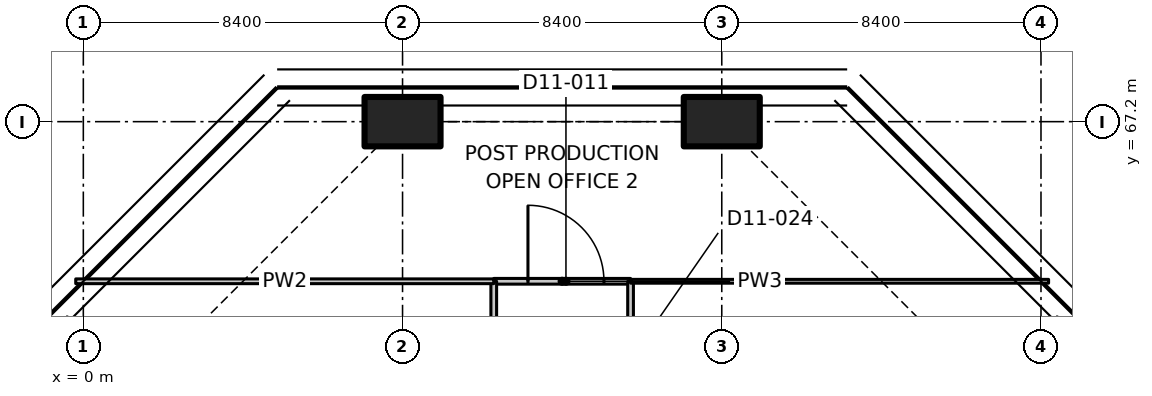
"""IFC4 building model, lengths in metres.
Left out: names, types, materials, properties, quantities, classifications, styles, units other than length and angle.
Written with IfcOpenShell. Run it as: python <this file> out.ifc"""

import sys

from ifc_helpers import new_model, si_unit, direction, frame, frame_2d, origin, origin_2d, place, context, subcontext, project, spatial, polyline, rectangle, outline, extrude, element, fill, save


model = new_model("IFC4")
c1 = context("Model", 3, precision=1e-05, world=origin(), true_north=direction((0.0, 1.0)))
c2 = subcontext(c1, "Body", "Model", "MODEL_VIEW")
j1 = project(units=[si_unit("LENGTHUNIT", "METRE"), si_unit("PLANEANGLEUNIT", "RADIAN")], contexts=[c1])
p1 = place(None, origin())
s1 = spatial("IfcSite", under=j1, at=p1, CompositionType="ELEMENT")
p2 = place(p1, origin())
s2 = spatial("IfcBuilding", under=s1, at=p2, CompositionType="ELEMENT")
p3 = place(p2, frame((0.0, 0.0, 79.7)))
s3 = spatial("IfcBuildingStorey", under=s2, at=p3, CompositionType="ELEMENT", Elevation=79.7)
for number, where, z_axis, x_axis in (
    (1, (8.4, 67.2, 0.0), (0.0, 0.0, 1.0), (0.0, 1.0, 0.0)),
    (2, (16.8, 67.2, 0.0), (0.0, 0.0, 1.0), (0.0, 1.0, 0.0)),
):
    element("IfcColumn", number, at=place(p3, frame(where, z_axis=z_axis, x_axis=x_axis)), inside=s3, PredefinedType="COLUMN", context=c2, shape_type="SweptSolid", body=[
        extrude(rectangle(XDim=1.3, YDim=2.0, at=origin_2d()), origin(), (0.0, 0.0, 1.0), 3.35),
    ])
p4 = place(p3, frame((10.8, 63.0, 0.0), z_axis=(0.0, 0.0, 1.0), x_axis=(1.0, 0.0, 0.0)))
e3 = element("IfcWall", 3, at=p4, inside=s3, PredefinedType="PARTITIONING", context=c2, shape_type="SweptSolid", body=[
    extrude(rectangle(XDim=3.6, YDim=0.15, at=frame_2d((1.8, 0.0))), origin(), (0.0, 0.0, 1.0), 3.33),
])
p5 = place(p4, frame((0.9, 0.0, 0.0)))
e4 = element("IfcOpeningElement", 4, at=p5, cuts=e3, PredefinedType="OPENING", context=c2, shape_type="SweptSolid", body=[
    extrude(rectangle(XDim=2.0, YDim=2.4, at=frame_2d((1.0, 1.2))), frame((0.0, 0.085, 0.0), z_axis=(0.0, -1.0, 0.0), x_axis=(1.0, 0.0, 0.0)), (0.0, 0.0, 1.0), 0.17),
])
p6 = place(p3, frame((10.8, 54.6, 0.0), z_axis=(0.0, 0.0, 1.0), x_axis=(0.0, 1.0, 0.0)))
e5 = element("IfcWall", 5, at=p6, inside=s3, PredefinedType="PARTITIONING", context=c2, shape_type="SweptSolid", body=[
    extrude(rectangle(XDim=8.4, YDim=0.15, at=frame_2d((4.2, 0.0))), origin(), (0.0, 0.0, 1.0), 3.33),
])
p7 = place(p6, frame((3.3, 0.0, 0.0)))
e6 = element("IfcOpeningElement", 6, at=p7, cuts=e5, PredefinedType="OPENING", context=c2, shape_type="SweptSolid", body=[
    extrude(rectangle(XDim=1.6, YDim=2.1, at=frame_2d((0.8, 1.05))), frame((0.0, 0.085, 0.0), z_axis=(0.0, -1.0, 0.0), x_axis=(1.0, 0.0, 0.0)), (0.0, 0.0, 1.0), 0.17),
])
p8 = place(p3, frame((14.4, 63.0, 0.0), z_axis=(0.0, 0.0, 1.0), x_axis=(0.0, -1.0, 0.0)))
e7 = element("IfcWall", 7, at=p8, inside=s3, PredefinedType="PARTITIONING", context=c2, shape_type="SweptSolid", body=[
    extrude(rectangle(XDim=4.2, YDim=0.15, at=frame_2d((2.1, 0.0))), origin(), (0.0, 0.0, 1.0), 3.33),
])
p9 = place(p8, frame((1.5, 0.0, 0.0)))
e8 = element("IfcOpeningElement", 8, at=p9, cuts=e7, PredefinedType="OPENING", context=c2, shape_type="SweptSolid", body=[
    extrude(rectangle(XDim=1.1, YDim=2.1, at=frame_2d((0.55, 1.05))), frame((0.0, 0.085, 0.0), z_axis=(0.0, -1.0, 0.0), x_axis=(1.0, 0.0, 0.0)), (0.0, 0.0, 1.0), 0.17),
])
p10 = place(p3, frame((10.8, 63.0, 0.0), z_axis=(0.0, 0.0, 1.0), x_axis=(-1.0, 0.0, 0.0)))
e9 = element("IfcWall", 9, at=p10, inside=s3, PredefinedType="PARTITIONING", context=c2, shape_type="SweptSolid", body=[
    extrude(outline(polyline([(0.0, 0.0), (11.0, 0.0), (11.0, 3.33), (7.278, 3.33), (7.276, 2.98), (5.924, 2.98), (5.922, 3.33), (0.0, 3.33), (0.0, 0.0)])), frame((0.0, 0.062, 0.0), z_axis=(0.0, -1.0, 0.0), x_axis=(1.0, 0.0, 0.0)), (0.0, 0.0, 1.0), 0.125),
])
p11 = place(p3, frame((25.4, 63.0, 0.0), z_axis=(0.0, 0.0, 1.0), x_axis=(-1.0, 0.0, 0.0)))
e10 = element("IfcWall", 10, at=p11, inside=s3, PredefinedType="PARTITIONING", context=c2, shape_type="SweptSolid", body=[
    extrude(outline(polyline([(0.0, 0.0), (11.0, 0.0), (11.0, 3.33), (5.066, 3.33), (5.064, 2.98), (3.736, 2.98), (3.734, 3.33), (0.0, 3.33), (0.0, 0.0)])), frame((0.0, 0.05, 0.0), z_axis=(0.0, -1.0, 0.0), x_axis=(1.0, 0.0, 0.0)), (0.0, 0.0, 1.0), 0.1),
])
p12 = place(p5, origin())
e11 = element("IfcDoor", 11, at=p12, inside=s3, OperationType="DOUBLE_DOOR_SINGLE_SWING", PredefinedType="DOOR", context=c2, shape_type="SweptSolid", body=[
    extrude(rectangle(XDim=2.0, YDim=2.4, at=frame_2d((1.0, 1.2))), frame((0.0, 0.025, 0.0), z_axis=(0.0, -1.0, 0.0), x_axis=(1.0, 0.0, 0.0)), (0.0, 0.0, 1.0), 0.05),
])
fill(e4, e11)
save(model, sys.argv[1])
